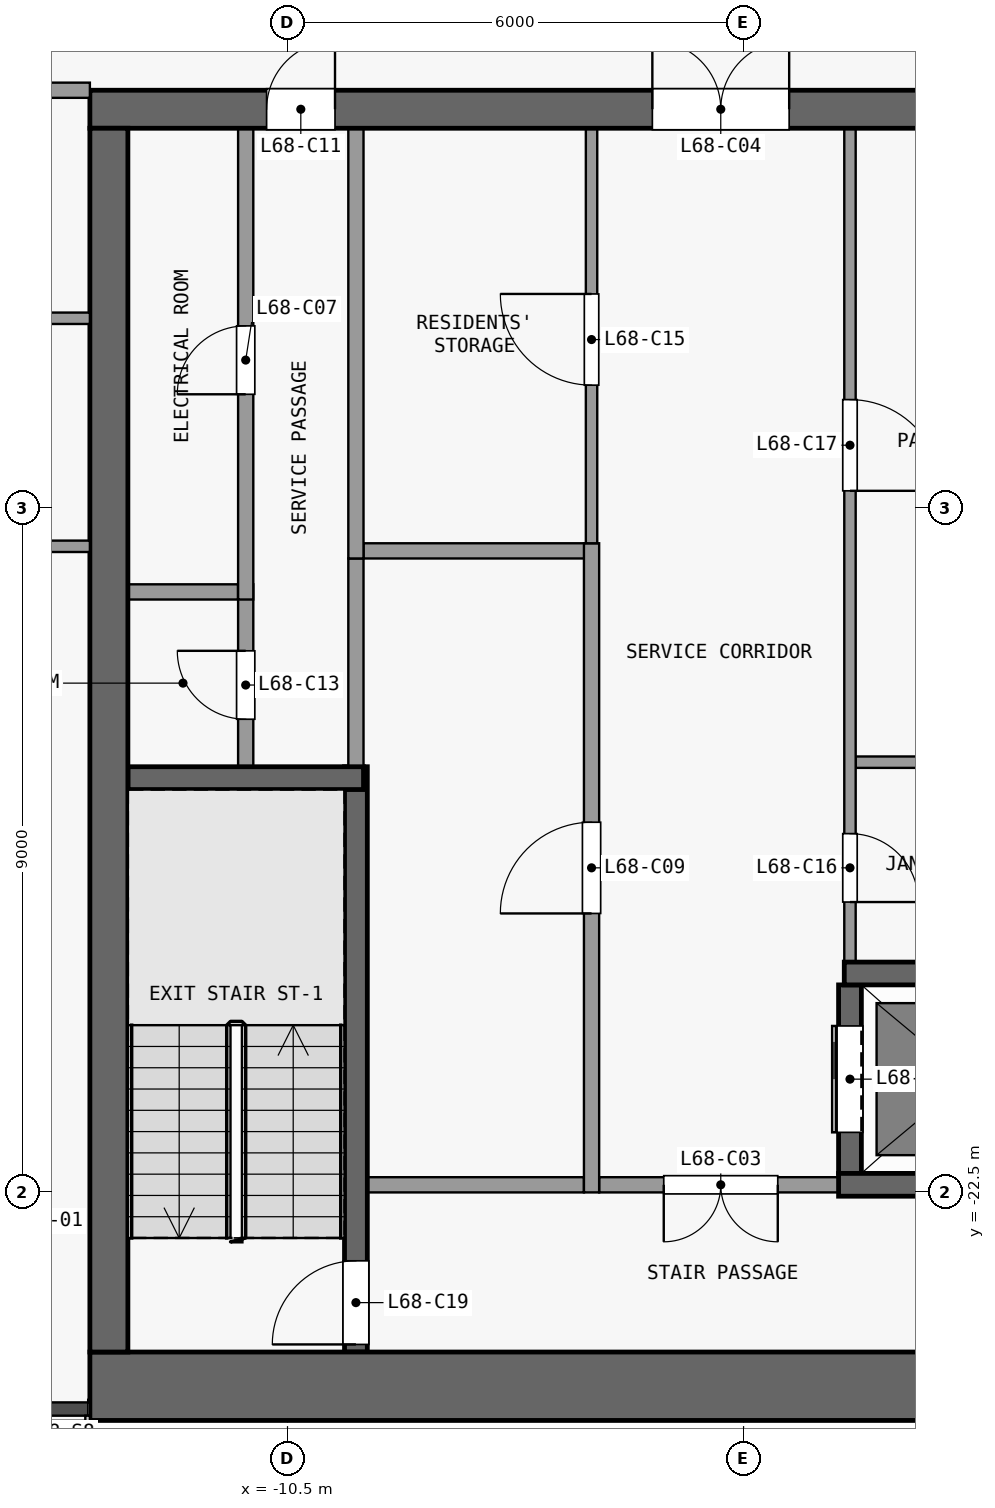
"""IFC4 building model, lengths in metres.
Left out: names, types, materials, properties, quantities, classifications, styles, units other than length and angle.
Written with IfcOpenShell. Run it as: python <this file> out.ifc"""

import sys

from ifc_helpers import new_model, si_unit, direction, frame, frame_2d, origin, place, context, subcontext, project, spatial, rectangle, extrude, element, fill, save


model = new_model("IFC4")
c1 = context("Model", 3, precision=1e-05, world=origin(), true_north=direction((0.0, 1.0)))
c2 = subcontext(c1, "Body", "Model", "MODEL_VIEW")
j1 = project(units=[si_unit("LENGTHUNIT", "METRE"), si_unit("PLANEANGLEUNIT", "RADIAN")], contexts=[c1])
p1 = place(None, origin())
s1 = spatial("IfcSite", under=j1, at=p1, CompositionType="ELEMENT")
p2 = place(p1, origin())
s2 = spatial("IfcBuilding", under=s1, at=p2, CompositionType="ELEMENT")
p3 = place(p2, frame((0.0, 0.0, 269.9)))
s3 = spatial("IfcBuildingStorey", under=s2, at=p3, CompositionType="ELEMENT", Elevation=269.9)
p4 = place(p3, frame((-13.1, -25.05, 0.0), z_axis=(0.0, 0.0, 1.0), x_axis=(1.0, 0.0, 0.0)))
e1 = element("IfcWall", 1, at=p4, inside=s3, PredefinedType="SHEAR", context=c2, shape_type="SweptSolid", body=[
    extrude(rectangle(XDim=26.2, YDim=0.9, at=frame_2d((13.1, 0.0))), origin(), (0.0, 0.0, 1.0), 3.3),
])
p5 = place(p3, frame((-13.1, -8.25, 0.0), z_axis=(0.0, 0.0, 1.0), x_axis=(1.0, 0.0, 0.0)))
e2 = element("IfcWall", 2, at=p5, inside=s3, PredefinedType="SHEAR", context=c2, shape_type="SweptSolid", body=[
    extrude(rectangle(XDim=26.2, YDim=0.5, at=frame_2d((13.1, 0.0))), origin(), (0.0, 0.0, 1.0), 3.3),
])
p6 = place(p5, frame((7.4, 0.0, 0.0)))
e3 = element("IfcOpeningElement", 3, at=p6, cuts=e2, PredefinedType="OPENING", context=c2, shape_type="SweptSolid", body=[
    extrude(rectangle(XDim=1.8, YDim=2.1, at=frame_2d((0.9, 1.05))), frame((0.0, 0.26, 0.0), z_axis=(0.0, -1.0, 0.0), x_axis=(1.0, 0.0, 0.0)), (0.0, 0.0, 1.0), 0.52),
])
p7 = place(p5, frame((17.0, 0.0, 0.0)))
e4 = element("IfcOpeningElement", 4, at=p7, cuts=e2, PredefinedType="OPENING", context=c2, shape_type="SweptSolid", body=[
    extrude(rectangle(XDim=1.8, YDim=2.1, at=frame_2d((0.9, 1.05))), frame((0.0, 0.26, 0.0), z_axis=(0.0, -1.0, 0.0), x_axis=(1.0, 0.0, 0.0)), (0.0, 0.0, 1.0), 0.52),
])
p8 = place(p5, frame((2.325, 0.0, 0.0)))
e5 = element("IfcOpeningElement", 5, at=p8, cuts=e2, PredefinedType="OPENING", context=c2, shape_type="SweptSolid", body=[
    extrude(rectangle(XDim=0.9, YDim=2.1, at=frame_2d((0.45, 1.05))), frame((0.0, 0.26, 0.0), z_axis=(0.0, -1.0, 0.0), x_axis=(1.0, 0.0, 0.0)), (0.0, 0.0, 1.0), 0.52),
])
p9 = place(p5, frame((22.975, 0.0, 0.0)))
e6 = element("IfcOpeningElement", 6, at=p9, cuts=e2, PredefinedType="OPENING", context=c2, shape_type="SweptSolid", body=[
    extrude(rectangle(XDim=0.9, YDim=2.1, at=frame_2d((0.45, 1.05))), frame((0.0, 0.26, 0.0), z_axis=(0.0, -1.0, 0.0), x_axis=(1.0, 0.0, 0.0)), (0.0, 0.0, 1.0), 0.52),
])
p10 = place(p3, frame((-12.85, -24.6, 0.0), z_axis=(0.0, 0.0, 1.0), x_axis=(0.0, 1.0, 0.0)))
e7 = element("IfcWall", 7, at=p10, inside=s3, PredefinedType="SHEAR", context=c2, shape_type="SweptSolid", body=[
    extrude(rectangle(XDim=16.1, YDim=0.5, at=frame_2d((8.05, 0.0))), origin(), (0.0, 0.0, 1.0), 3.3),
])
p11 = place(p3, frame((-9.45, -22.4, 0.0), z_axis=(0.0, 0.0, 1.0), x_axis=(1.0, 0.0, 0.0)))
e8 = element("IfcWall", 8, at=p11, inside=s3, PredefinedType="PARTITIONING", context=c2, shape_type="SweptSolid", body=[
    extrude(rectangle(XDim=2.85, YDim=0.2, at=frame_2d((1.425, 0.0))), origin(), (0.0, 0.0, 1.0), 3.3),
])
p12 = place(p3, frame((-3.25, -22.4, 0.0), z_axis=(0.0, 0.0, 1.0), x_axis=(-1.0, 0.0, 0.0)))
e9 = element("IfcWall", 9, at=p12, inside=s3, PredefinedType="PARTITIONING", context=c2, shape_type="SweptSolid", body=[
    extrude(rectangle(XDim=3.15, YDim=0.2, at=frame_2d((1.575, 0.0))), origin(), (0.0, 0.0, 1.0), 3.3),
])
p13 = place(p12, frame((0.8, 0.0, 0.0)))
e10 = element("IfcOpeningElement", 10, at=p13, cuts=e9, PredefinedType="OPENING", context=c2, shape_type="SweptSolid", body=[
    extrude(rectangle(XDim=1.5, YDim=2.1, at=frame_2d((0.75, 1.05))), frame((0.0, 0.11, 0.0), z_axis=(0.0, -1.0, 0.0), x_axis=(1.0, 0.0, 0.0)), (0.0, 0.0, 1.0), 0.22),
])
p14 = place(p3, frame((-3.25, -22.4, 0.0), z_axis=(0.0, 0.0, 1.0), x_axis=(1.0, 0.0, 0.0)))
e11 = element("IfcWall", 11, at=p14, inside=s3, PredefinedType="SHEAR", context=c2, shape_type="SweptSolid", body=[
    extrude(rectangle(XDim=6.5, YDim=0.3, at=frame_2d((3.25, 0.0))), origin(), (0.0, 0.0, 1.0), 3.3),
])
p15 = place(p3, frame((-3.175, -19.62, 0.0), z_axis=(0.0, 0.0, 1.0), x_axis=(1.0, 0.0, 0.0)))
e12 = element("IfcWall", 12, at=p15, inside=s3, PredefinedType="SHEAR", context=c2, shape_type="SweptSolid", body=[
    extrude(rectangle(XDim=3.025, YDim=0.3, at=frame_2d((1.513, 0.0))), origin(), (0.0, 0.0, 1.0), 3.3),
])
p16 = place(p3, frame((-12.6, -17.05, 0.0), z_axis=(0.0, 0.0, 1.0), x_axis=(1.0, 0.0, 0.0)))
e13 = element("IfcWall", 13, at=p16, inside=s3, PredefinedType="SHEAR", context=c2, shape_type="SweptSolid", body=[
    extrude(rectangle(XDim=3.1, YDim=0.3, at=frame_2d((1.55, 0.0))), origin(), (0.0, 0.0, 1.0), 3.3),
])
p17 = place(p3, frame((-3.025, -16.84, 0.0), z_axis=(0.0, 0.0, 1.0), x_axis=(1.0, 0.0, 0.0)))
e14 = element("IfcWall", 14, at=p17, inside=s3, PredefinedType="PARTITIONING", context=c2, shape_type="SweptSolid", body=[
    extrude(rectangle(XDim=2.925, YDim=0.15, at=frame_2d((1.462, 0.0))), origin(), (0.0, 0.0, 1.0), 3.3),
])
p18 = place(p3, frame((-12.6, -14.6, 0.0), z_axis=(0.0, 0.0, 1.0), x_axis=(1.0, 0.0, 0.0)))
e15 = element("IfcWall", 15, at=p18, inside=s3, PredefinedType="PARTITIONING", context=c2, shape_type="SweptSolid", body=[
    extrude(rectangle(XDim=1.45, YDim=0.2, at=frame_2d((0.725, 0.0))), origin(), (0.0, 0.0, 1.0), 3.3),
])
p19 = place(p3, frame((-9.5, -14.06, 0.0), z_axis=(0.0, 0.0, 1.0), x_axis=(1.0, 0.0, 0.0)))
e16 = element("IfcWall", 16, at=p19, inside=s3, PredefinedType="PARTITIONING", context=c2, shape_type="SweptSolid", body=[
    extrude(rectangle(XDim=3.075, YDim=0.2, at=frame_2d((1.538, 0.0))), origin(), (0.0, 0.0, 1.0), 3.3),
])
p20 = place(p3, frame((-11.05, -16.9, 0.0), z_axis=(0.0, 0.0, 1.0), x_axis=(0.0, 1.0, 0.0)))
e17 = element("IfcWall", 17, at=p20, inside=s3, PredefinedType="PARTITIONING", context=c2, shape_type="SweptSolid", body=[
    extrude(rectangle(XDim=2.4, YDim=0.2, at=frame_2d((1.2, 0.0))), origin(), (0.0, 0.0, 1.0), 3.3),
])
p21 = place(p20, frame((0.625, 0.0, 0.0)))
e18 = element("IfcOpeningElement", 18, at=p21, cuts=e17, PredefinedType="OPENING", context=c2, shape_type="SweptSolid", body=[
    extrude(rectangle(XDim=0.9, YDim=2.1, at=frame_2d((0.45, 1.05))), frame((0.0, 0.11, 0.0), z_axis=(0.0, -1.0, 0.0), x_axis=(1.0, 0.0, 0.0)), (0.0, 0.0, 1.0), 0.22),
])
p22 = place(p3, frame((-11.05, -14.7, 0.0), z_axis=(0.0, 0.0, 1.0), x_axis=(0.0, 1.0, 0.0)))
e19 = element("IfcWall", 19, at=p22, inside=s3, PredefinedType="PARTITIONING", context=c2, shape_type="SweptSolid", body=[
    extrude(rectangle(XDim=6.2, YDim=0.2, at=frame_2d((3.1, 0.0))), origin(), (0.0, 0.0, 1.0), 3.3),
])
p23 = place(p22, frame((2.7, 0.0, 0.0)))
e20 = element("IfcOpeningElement", 20, at=p23, cuts=e19, PredefinedType="OPENING", context=c2, shape_type="SweptSolid", body=[
    extrude(rectangle(XDim=0.9, YDim=2.1, at=frame_2d((0.45, 1.05))), frame((0.0, 0.11, 0.0), z_axis=(0.0, -1.0, 0.0), x_axis=(1.0, 0.0, 0.0)), (0.0, 0.0, 1.0), 0.22),
])
p24 = place(p3, frame((-9.6, -24.6, 0.0), z_axis=(0.0, 0.0, 1.0), x_axis=(0.0, 1.0, 0.0)))
e21 = element("IfcWall", 21, at=p24, inside=s3, PredefinedType="SHEAR", context=c2, shape_type="SweptSolid", body=[
    extrude(rectangle(XDim=7.7, YDim=0.3, at=frame_2d((3.85, 0.0))), origin(), (0.0, 0.0, 1.0), 3.3),
])
p25 = place(p24, frame((0.1, 0.0, 0.0)))
e22 = element("IfcOpeningElement", 22, at=p25, cuts=e21, PredefinedType="OPENING", context=c2, shape_type="SweptSolid", body=[
    extrude(rectangle(XDim=1.1, YDim=2.1, at=frame_2d((0.55, 1.05))), frame((0.0, 0.16, 0.0), z_axis=(0.0, -1.0, 0.0), x_axis=(1.0, 0.0, 0.0)), (0.0, 0.0, 1.0), 0.32),
])
p26 = place(p3, frame((-9.6, -16.9, 0.0), z_axis=(0.0, 0.0, 1.0), x_axis=(0.0, 1.0, 0.0)))
e23 = element("IfcWall", 23, at=p26, inside=s3, PredefinedType="PARTITIONING", context=c2, shape_type="SweptSolid", body=[
    extrude(rectangle(XDim=2.74, YDim=0.2, at=frame_2d((1.37, 0.0))), origin(), (0.0, 0.0, 1.0), 3.3),
])
p27 = place(p3, frame((-9.6, -14.16, 0.0), z_axis=(0.0, 0.0, 1.0), x_axis=(0.0, 1.0, 0.0)))
e24 = element("IfcWall", 24, at=p27, inside=s3, PredefinedType="PARTITIONING", context=c2, shape_type="SweptSolid", body=[
    extrude(rectangle(XDim=5.66, YDim=0.2, at=frame_2d((2.83, 0.0))), origin(), (0.0, 0.0, 1.0), 3.3),
])
p28 = place(p3, frame((-6.5, -22.5, 0.0), z_axis=(0.0, 0.0, 1.0), x_axis=(0.0, 1.0, 0.0)))
e25 = element("IfcWall", 25, at=p28, inside=s3, PredefinedType="PARTITIONING", context=c2, shape_type="SweptSolid", body=[
    extrude(rectangle(XDim=8.54, YDim=0.2, at=frame_2d((4.27, 0.0))), origin(), (0.0, 0.0, 1.0), 3.3),
])
p29 = place(p28, frame((3.67, 0.0, 0.0)))
e26 = element("IfcOpeningElement", 26, at=p29, cuts=e25, PredefinedType="OPENING", context=c2, shape_type="SweptSolid", body=[
    extrude(rectangle(XDim=1.2, YDim=2.1, at=frame_2d((0.6, 1.05))), frame((0.0, 0.11, 0.0), z_axis=(0.0, -1.0, 0.0), x_axis=(1.0, 0.0, 0.0)), (0.0, 0.0, 1.0), 0.22),
])
p30 = place(p3, frame((-6.5, -13.96, 0.0), z_axis=(0.0, 0.0, 1.0), x_axis=(0.0, 1.0, 0.0)))
e27 = element("IfcWall", 27, at=p30, inside=s3, PredefinedType="PARTITIONING", context=c2, shape_type="SweptSolid", body=[
    extrude(rectangle(XDim=5.46, YDim=0.15, at=frame_2d((2.73, 0.0))), origin(), (0.0, 0.0, 1.0), 3.3),
])
p31 = place(p30, frame((2.08, 0.0, 0.0)))
e28 = element("IfcOpeningElement", 28, at=p31, cuts=e27, PredefinedType="OPENING", context=c2, shape_type="SweptSolid", body=[
    extrude(rectangle(XDim=1.2, YDim=2.1, at=frame_2d((0.6, 1.05))), frame((0.0, 0.085, 0.0), z_axis=(0.0, -1.0, 0.0), x_axis=(1.0, 0.0, 0.0)), (0.0, 0.0, 1.0), 0.17),
])
p32 = place(p3, frame((-3.1, -22.25, 0.0), z_axis=(0.0, 0.0, 1.0), x_axis=(0.0, 1.0, 0.0)))
e29 = element("IfcWall", 29, at=p32, inside=s3, PredefinedType="SHEAR", context=c2, shape_type="SweptSolid", body=[
    extrude(rectangle(XDim=2.48, YDim=0.3, at=frame_2d((1.24, 0.0))), origin(), (0.0, 0.0, 1.0), 3.3),
])
p33 = place(p32, frame((0.54, 0.0, 0.0)))
e30 = element("IfcOpeningElement", 30, at=p33, cuts=e29, PredefinedType="OPENING", context=c2, shape_type="SweptSolid", body=[
    extrude(rectangle(XDim=1.4, YDim=2.1, at=frame_2d((0.7, 1.05))), frame((0.0, 0.16, 0.0), z_axis=(0.0, -1.0, 0.0), x_axis=(1.0, 0.0, 0.0)), (0.0, 0.0, 1.0), 0.32),
])
p34 = place(p3, frame((-3.1, -8.5, 0.0), z_axis=(0.0, 0.0, 1.0), x_axis=(0.0, -1.0, 0.0)))
e31 = element("IfcWall", 31, at=p34, inside=s3, PredefinedType="PARTITIONING", context=c2, shape_type="SweptSolid", body=[
    extrude(rectangle(XDim=10.97, YDim=0.15, at=frame_2d((5.485, 0.0))), origin(), (0.0, 0.0, 1.0), 3.3),
])
p35 = place(p34, frame((9.28, 0.0, 0.0)))
e32 = element("IfcOpeningElement", 32, at=p35, cuts=e31, PredefinedType="OPENING", context=c2, shape_type="SweptSolid", body=[
    extrude(rectangle(XDim=0.9, YDim=2.1, at=frame_2d((0.45, 1.05))), frame((0.0, 0.085, 0.0), z_axis=(0.0, -1.0, 0.0), x_axis=(1.0, 0.0, 0.0)), (0.0, 0.0, 1.0), 0.17),
])
p36 = place(p34, frame((3.57, 0.0, 0.0)))
e33 = element("IfcOpeningElement", 33, at=p36, cuts=e31, PredefinedType="OPENING", context=c2, shape_type="SweptSolid", body=[
    extrude(rectangle(XDim=1.2, YDim=2.1, at=frame_2d((0.6, 1.05))), frame((0.0, 0.085, 0.0), z_axis=(0.0, -1.0, 0.0), x_axis=(1.0, 0.0, 0.0)), (0.0, 0.0, 1.0), 0.17),
])
p37 = place(p3, frame((-19.262, -14.0, 0.0), z_axis=(0.0, 0.0, 1.0), x_axis=(1.0, 0.0, 0.0)))
e34 = element("IfcWall", 34, at=p37, inside=s3, PredefinedType="PARTITIONING", context=c2, shape_type="SweptSolid", body=[
    extrude(rectangle(XDim=6.162, YDim=0.15, at=frame_2d((3.081, 0.0))), origin(), (0.0, 0.0, 1.0), 3.3),
])
p38 = place(p37, frame((0.812, 0.0, 0.0)))
e35 = element("IfcOpeningElement", 35, at=p38, cuts=e34, PredefinedType="OPENING", context=c2, shape_type="SweptSolid", body=[
    extrude(rectangle(XDim=0.9, YDim=2.1, at=frame_2d((0.45, 1.05))), frame((0.0, 0.085, 0.0), z_axis=(0.0, -1.0, 0.0), x_axis=(1.0, 0.0, 0.0)), (0.0, 0.0, 1.0), 0.17),
])
p39 = place(p3, frame((-19.262, -11.0, 0.0), z_axis=(0.0, 0.0, 1.0), x_axis=(1.0, 0.0, 0.0)))
e36 = element("IfcWall", 36, at=p39, inside=s3, PredefinedType="PARTITIONING", context=c2, shape_type="SweptSolid", body=[
    extrude(rectangle(XDim=6.162, YDim=0.15, at=frame_2d((3.081, 0.0))), origin(), (0.0, 0.0, 1.0), 3.3),
])
p40 = place(p39, frame((1.113, 0.0, 0.0)))
e37 = element("IfcOpeningElement", 37, at=p40, cuts=e36, PredefinedType="OPENING", context=c2, shape_type="SweptSolid", body=[
    extrude(rectangle(XDim=0.9, YDim=2.1, at=frame_2d((0.45, 1.05))), frame((0.0, 0.085, 0.0), z_axis=(0.0, -1.0, 0.0), x_axis=(1.0, 0.0, 0.0)), (0.0, 0.0, 1.0), 0.17),
])
p41 = place(p39, frame((4.162, 0.0, 0.0)))
e38 = element("IfcOpeningElement", 38, at=p41, cuts=e36, PredefinedType="OPENING", context=c2, shape_type="SweptSolid", body=[
    extrude(rectangle(XDim=0.9, YDim=2.1, at=frame_2d((0.45, 1.05))), frame((0.0, 0.085, 0.0), z_axis=(0.0, -1.0, 0.0), x_axis=(1.0, 0.0, 0.0)), (0.0, 0.0, 1.0), 0.17),
])
p42 = place(p3, frame((-19.262, -8.0, 0.0), z_axis=(0.0, 0.0, 1.0), x_axis=(1.0, 0.0, 0.0)))
e39 = element("IfcWall", 39, at=p42, inside=s3, PredefinedType="PARTITIONING", context=c2, shape_type="SweptSolid", body=[
    extrude(rectangle(XDim=6.162, YDim=0.2, at=frame_2d((3.081, 0.0))), origin(), (0.0, 0.0, 1.0), 3.3),
])
p43 = place(p42, frame((2.512, 0.0, 0.0)))
e40 = element("IfcOpeningElement", 40, at=p43, cuts=e39, PredefinedType="OPENING", context=c2, shape_type="SweptSolid", body=[
    extrude(rectangle(XDim=1.0, YDim=2.1, at=frame_2d((0.5, 1.05))), frame((0.0, 0.11, 0.0), z_axis=(0.0, -1.0, 0.0), x_axis=(1.0, 0.0, 0.0)), (0.0, 0.0, 1.0), 0.22),
])
p44 = place(p33, origin())
e41 = element("IfcDoor", 41, at=p44, inside=s3, OperationType="DOUBLE_DOOR_SLIDING", PredefinedType="DOOR", context=c2, shape_type="SweptSolid", body=[
    extrude(rectangle(XDim=1.4, YDim=2.1, at=frame_2d((0.7, 1.05))), frame((0.0, 0.025, 0.0), z_axis=(0.0, -1.0, 0.0), x_axis=(1.0, 0.0, 0.0)), (0.0, 0.0, 1.0), 0.05),
])
fill(e30, e41)
p45 = place(p13, origin())
e42 = element("IfcDoor", 42, at=p45, inside=s3, OperationType="DOUBLE_DOOR_SINGLE_SWING", PredefinedType="DOOR", context=c2, shape_type="SweptSolid", body=[
    extrude(rectangle(XDim=1.5, YDim=2.1, at=frame_2d((0.75, 1.05))), frame((0.0, 0.025, 0.0), z_axis=(0.0, -1.0, 0.0), x_axis=(1.0, 0.0, 0.0)), (0.0, 0.0, 1.0), 0.05),
])
fill(e10, e42)
p46 = place(p6, origin())
e43 = element("IfcDoor", 43, at=p46, inside=s3, OperationType="DOUBLE_DOOR_SINGLE_SWING", PredefinedType="DOOR", context=c2, shape_type="SweptSolid", body=[
    extrude(rectangle(XDim=1.8, YDim=2.1, at=frame_2d((0.9, 1.05))), frame((0.0, 0.025, 0.0), z_axis=(0.0, -1.0, 0.0), x_axis=(1.0, 0.0, 0.0)), (0.0, 0.0, 1.0), 0.05),
])
fill(e3, e43)
p47 = place(p23, origin())
e44 = element("IfcDoor", 44, at=p47, inside=s3, OperationType="SINGLE_SWING_LEFT", PredefinedType="DOOR", context=c2, shape_type="SweptSolid", body=[
    extrude(rectangle(XDim=0.9, YDim=2.1, at=frame_2d((0.45, 1.05))), frame((0.0, 0.025, 0.0), z_axis=(0.0, -1.0, 0.0), x_axis=(1.0, 0.0, 0.0)), (0.0, 0.0, 1.0), 0.05),
])
fill(e20, e44)
p48 = place(p29, origin())
e45 = element("IfcDoor", 45, at=p48, inside=s3, OperationType="SINGLE_SWING_LEFT", PredefinedType="DOOR", context=c2, shape_type="SweptSolid", body=[
    extrude(rectangle(XDim=1.2, YDim=2.1, at=frame_2d((0.6, 1.05))), frame((0.0, 0.025, 0.0), z_axis=(0.0, -1.0, 0.0), x_axis=(1.0, 0.0, 0.0)), (0.0, 0.0, 1.0), 0.05),
])
fill(e26, e45)
p49 = place(p8, origin())
e46 = element("IfcDoor", 46, at=p49, inside=s3, OperationType="SINGLE_SWING_RIGHT", PredefinedType="DOOR", context=c2, shape_type="SweptSolid", body=[
    extrude(rectangle(XDim=0.9, YDim=2.1, at=frame_2d((0.45, 1.05))), frame((0.0, 0.025, 0.0), z_axis=(0.0, -1.0, 0.0), x_axis=(1.0, 0.0, 0.0)), (0.0, 0.0, 1.0), 0.05),
])
fill(e5, e46)
p50 = place(p21, origin())
e47 = element("IfcDoor", 47, at=p50, inside=s3, OperationType="SINGLE_SWING_RIGHT", PredefinedType="DOOR", context=c2, shape_type="SweptSolid", body=[
    extrude(rectangle(XDim=0.9, YDim=2.1, at=frame_2d((0.45, 1.05))), frame((0.0, 0.025, 0.0), z_axis=(0.0, -1.0, 0.0), x_axis=(1.0, 0.0, 0.0)), (0.0, 0.0, 1.0), 0.05),
])
fill(e18, e47)
p51 = place(p31, origin())
e48 = element("IfcDoor", 48, at=p51, inside=s3, OperationType="SINGLE_SWING_RIGHT", PredefinedType="DOOR", context=c2, shape_type="SweptSolid", body=[
    extrude(rectangle(XDim=1.2, YDim=2.1, at=frame_2d((0.6, 1.05))), frame((0.0, 0.025, 0.0), z_axis=(0.0, -1.0, 0.0), x_axis=(1.0, 0.0, 0.0)), (0.0, 0.0, 1.0), 0.05),
])
fill(e28, e48)
p52 = place(p35, origin())
e49 = element("IfcDoor", 49, at=p52, inside=s3, OperationType="SINGLE_SWING_RIGHT", PredefinedType="DOOR", context=c2, shape_type="SweptSolid", body=[
    extrude(rectangle(XDim=0.9, YDim=2.1, at=frame_2d((0.45, 1.05))), frame((0.0, 0.025, 0.0), z_axis=(0.0, -1.0, 0.0), x_axis=(1.0, 0.0, 0.0)), (0.0, 0.0, 1.0), 0.05),
])
fill(e32, e49)
p53 = place(p36, origin())
e50 = element("IfcDoor", 50, at=p53, inside=s3, OperationType="SINGLE_SWING_RIGHT", PredefinedType="DOOR", context=c2, shape_type="SweptSolid", body=[
    extrude(rectangle(XDim=1.2, YDim=2.1, at=frame_2d((0.6, 1.05))), frame((0.0, 0.025, 0.0), z_axis=(0.0, -1.0, 0.0), x_axis=(1.0, 0.0, 0.0)), (0.0, 0.0, 1.0), 0.05),
])
fill(e33, e50)
p54 = place(p25, origin())
e51 = element("IfcDoor", 51, at=p54, inside=s3, OperationType="SINGLE_SWING_LEFT", PredefinedType="DOOR", context=c2, shape_type="SweptSolid", body=[
    extrude(rectangle(XDim=1.1, YDim=2.1, at=frame_2d((0.55, 1.05))), frame((0.0, 0.025, 0.0), z_axis=(0.0, -1.0, 0.0), x_axis=(1.0, 0.0, 0.0)), (0.0, 0.0, 1.0), 0.05),
])
fill(e22, e51)
save(model, sys.argv[1])
